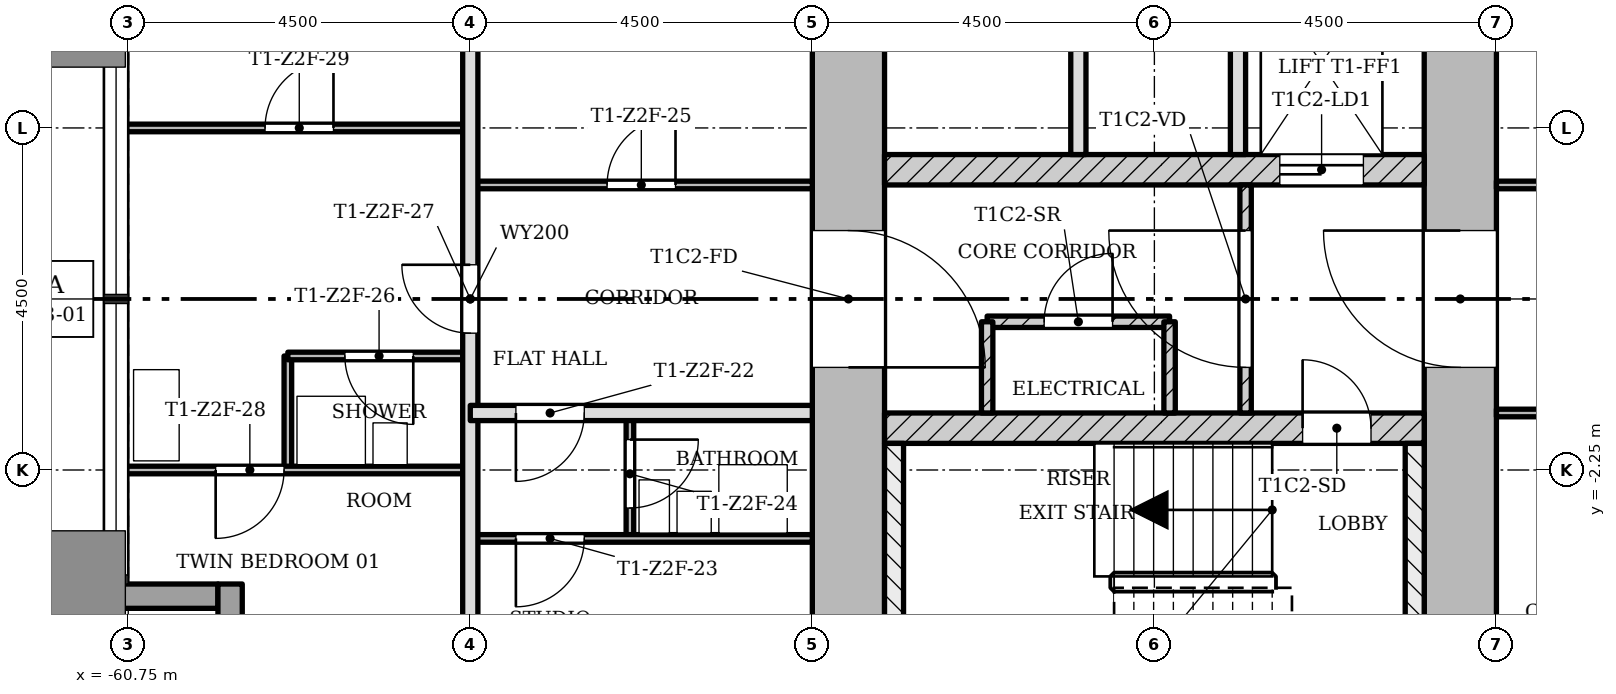
"""IFC4 building model, lengths in metres.
Left out: names, types, materials, properties, quantities, classifications, styles, units other than length and angle.
Written with IfcOpenShell. Run it as: python <this file> out.ifc"""

import sys

from ifc_helpers import new_model, si_unit, direction, frame, frame_2d, origin, place, context, subcontext, project, spatial, rectangle, extrude, element, fill, save


model = new_model("IFC4")
c1 = context("Model", 3, precision=1e-05, world=origin(), true_north=direction((0.0, 1.0)))
c2 = subcontext(c1, "Body", "Model", "MODEL_VIEW")
j1 = project(units=[si_unit("LENGTHUNIT", "METRE"), si_unit("PLANEANGLEUNIT", "RADIAN")], contexts=[c1])
p1 = place(None, origin())
s1 = spatial("IfcSite", under=j1, at=p1, CompositionType="ELEMENT")
p2 = place(p1, origin())
s2 = spatial("IfcBuilding", under=s1, at=p2, CompositionType="ELEMENT")
p3 = place(p2, frame((0.0, 0.0, 114.0)))
s3 = spatial("IfcBuildingStorey", under=s2, at=p3, CompositionType="ELEMENT", Elevation=114.0)
p4 = place(p3, frame((-43.225, -5.8, 0.0), z_axis=(0.0, 0.0, 1.0), x_axis=(0.0, 1.0, 0.0)))
e1 = element("IfcWall", 1, at=p4, inside=s3, PredefinedType="SHEAR", context=c2, shape_type="SweptSolid", body=[
    extrude(rectangle(XDim=12.55, YDim=0.95, at=frame_2d((6.275, 0.0))), origin(), (0.0, 0.0, 1.0), 3.4),
])
p5 = place(p4, frame((4.9, 0.0, 0.0)))
e2 = element("IfcOpeningElement", 2, at=p5, cuts=e1, PredefinedType="OPENING", context=c2, shape_type="SweptSolid", body=[
    extrude(rectangle(XDim=1.8, YDim=2.1, at=frame_2d((0.9, 1.05))), frame((0.0, 0.485, 0.0), z_axis=(0.0, -1.0, 0.0), x_axis=(1.0, 0.0, 0.0)), (0.0, 0.0, 1.0), 0.97),
])
p6 = place(p3, frame((-51.275, 5.8, 0.0), z_axis=(0.0, 0.0, 1.0), x_axis=(0.0, -1.0, 0.0)))
e3 = element("IfcWall", 3, at=p6, inside=s3, PredefinedType="SHEAR", context=c2, shape_type="SweptSolid", body=[
    extrude(rectangle(XDim=12.55, YDim=0.95, at=frame_2d((6.275, 0.0))), origin(), (0.0, 0.0, 1.0), 3.4),
])
p7 = place(p6, frame((4.9, 0.0, 0.0)))
e4 = element("IfcOpeningElement", 4, at=p7, cuts=e3, PredefinedType="OPENING", context=c2, shape_type="SweptSolid", body=[
    extrude(rectangle(XDim=1.8, YDim=2.1, at=frame_2d((0.9, 1.05))), frame((0.0, 0.485, 0.0), z_axis=(0.0, -1.0, 0.0), x_axis=(1.0, 0.0, 0.0)), (0.0, 0.0, 1.0), 0.97),
])
p8 = place(p3, frame((-50.8, -1.7, 0.0), z_axis=(0.0, 0.0, 1.0), x_axis=(1.0, 0.0, 0.0)))
e5 = element("IfcWall", 5, at=p8, inside=s3, PredefinedType="SHEAR", context=c2, shape_type="SweptSolid", body=[
    extrude(rectangle(XDim=7.1, YDim=0.4, at=frame_2d((3.55, 0.0))), origin(), (0.0, 0.0, 1.0), 3.4),
])
p9 = place(p8, frame((5.5, 0.0, 0.0)))
e6 = element("IfcOpeningElement", 6, at=p9, cuts=e5, PredefinedType="OPENING", context=c2, shape_type="SweptSolid", body=[
    extrude(rectangle(XDim=0.9, YDim=2.1, at=frame_2d((0.45, 1.05))), frame((0.0, 0.21, 0.0), z_axis=(0.0, -1.0, 0.0), x_axis=(1.0, 0.0, 0.0)), (0.0, 0.0, 1.0), 0.42),
])
p10 = place(p3, frame((-50.8, 1.7, 0.0), z_axis=(0.0, 0.0, 1.0), x_axis=(1.0, 0.0, 0.0)))
e7 = element("IfcWall", 7, at=p10, inside=s3, PredefinedType="SHEAR", context=c2, shape_type="SweptSolid", body=[
    extrude(rectangle(XDim=7.1, YDim=0.4, at=frame_2d((3.55, 0.0))), origin(), (0.0, 0.0, 1.0), 3.4),
])
p11 = place(p10, frame((5.2, 0.0, 0.0)))
e8 = element("IfcOpeningElement", 8, at=p11, cuts=e7, PredefinedType="OPENING", context=c2, shape_type="SweptSolid", body=[
    extrude(rectangle(XDim=1.1, YDim=2.1, at=frame_2d((0.55, 1.05))), frame((0.0, 0.21, 0.0), z_axis=(0.0, -1.0, 0.0), x_axis=(1.0, 0.0, 0.0)), (0.0, 0.0, 1.0), 0.42),
])
p12 = place(p3, frame((-61.07, -3.91, -0.3), z_axis=(0.0, 0.0, 1.0), x_axis=(1.0, 0.0, 0.0)))
e9 = element("IfcWall", 9, at=p12, inside=s3, PredefinedType="STANDARD", context=c2, shape_type="SweptSolid", body=[
    extrude(rectangle(XDim=1.5, YDim=0.32, at=frame_2d((0.75, 0.0))), origin(), (0.0, 0.0, 1.0), 3.4),
])
p13 = place(p3, frame((-59.41, -3.75, -0.3), z_axis=(0.0, 0.0, 1.0), x_axis=(0.0, -1.0, 0.0)))
e10 = element("IfcWall", 10, at=p13, inside=s3, PredefinedType="STANDARD", context=c2, shape_type="SweptSolid", body=[
    extrude(rectangle(XDim=1.82, YDim=0.32, at=frame_2d((0.91, 0.0))), origin(), (0.0, 0.0, 1.0), 3.4),
])
p14 = place(p13, frame((0.41, 0.0, 1.2)))
e11 = element("IfcOpeningElement", 11, at=p14, cuts=e10, PredefinedType="OPENING", context=c2, shape_type="SweptSolid", body=[
    extrude(rectangle(XDim=1.0, YDim=1.5, at=frame_2d((0.5, 0.75))), frame((0.0, 0.17, 0.0), z_axis=(0.0, -1.0, 0.0), x_axis=(1.0, 0.0, 0.0)), (0.0, 0.0, 1.0), 0.34),
])
p15 = place(p3, frame((-46.05, 1.5, 0.0), z_axis=(0.0, 0.0, 1.0), x_axis=(0.0, -1.0, 0.0)))
e12 = element("IfcWall", 12, at=p15, inside=s3, PredefinedType="PARTITIONING", context=c2, shape_type="SweptSolid", body=[
    extrude(rectangle(XDim=3.0, YDim=0.15, at=frame_2d((1.5, 0.0))), origin(), (0.0, 0.0, 1.0), 3.0),
])
p16 = place(p15, frame((0.6, 0.0, 0.0)))
e13 = element("IfcOpeningElement", 13, at=p16, cuts=e12, PredefinedType="OPENING", context=c2, shape_type="SweptSolid", body=[
    extrude(rectangle(XDim=1.8, YDim=2.1, at=frame_2d((0.9, 1.05))), frame((0.0, 0.085, 0.0), z_axis=(0.0, -1.0, 0.0), x_axis=(1.0, 0.0, 0.0)), (0.0, 0.0, 1.0), 0.17),
])
for number, where, z_axis, x_axis in (
    (14, (-46.15, 5.8, 0.0), (0.0, 0.0, 1.0), (0.0, -1.0, 0.0)),
    (15, (-48.25, 5.8, 0.0), (0.0, 0.0, 1.0), (0.0, -1.0, 0.0)),
):
    element("IfcWall", number, at=place(p3, frame(where, z_axis=z_axis, x_axis=x_axis)), inside=s3, PredefinedType="SOLIDWALL", context=c2, shape_type="SweptSolid", body=[
        extrude(rectangle(XDim=3.9, YDim=0.2, at=frame_2d((1.95, 0.0))), origin(), (0.0, 0.0, 1.0), 3.0),
    ])
p17 = place(p3, frame((-47.05, -0.3, 0.0), z_axis=(0.0, 0.0, 1.0), x_axis=(-1.0, 0.0, 0.0)))
e16 = element("IfcWall", 16, at=p17, inside=s3, PredefinedType="PARTITIONING", context=c2, shape_type="SweptSolid", body=[
    extrude(rectangle(XDim=2.4, YDim=0.15, at=frame_2d((1.2, 0.0))), origin(), (0.0, 0.0, 1.0), 3.0),
])
p18 = place(p17, frame((0.75, 0.0, 0.0)))
e17 = element("IfcOpeningElement", 17, at=p18, cuts=e16, PredefinedType="OPENING", context=c2, shape_type="SweptSolid", body=[
    extrude(rectangle(XDim=0.9, YDim=2.1, at=frame_2d((0.45, 1.05))), frame((0.0, 0.085, 0.0), z_axis=(0.0, -1.0, 0.0), x_axis=(1.0, 0.0, 0.0)), (0.0, 0.0, 1.0), 0.17),
])
for number, where, z_axis, x_axis in (
    (18, (-47.05, -0.3, 0.0), (0.0, 0.0, 1.0), (0.0, -1.0, 0.0)),
    (19, (-49.45, -0.3, 0.0), (0.0, 0.0, 1.0), (0.0, -1.0, 0.0)),
):
    element("IfcWall", number, at=place(p3, frame(where, z_axis=z_axis, x_axis=x_axis)), inside=s3, PredefinedType="PARTITIONING", context=c2, shape_type="SweptSolid", body=[
        extrude(rectangle(XDim=1.2, YDim=0.15, at=frame_2d((0.6, 0.0))), origin(), (0.0, 0.0, 1.0), 3.0),
    ])
p19 = place(p3, frame((-58.65, -2.25, 0.0), z_axis=(0.0, 0.0, 1.0), x_axis=(0.0, 1.0, 0.0)))
e20 = element("IfcWall", 20, at=p19, inside=s3, PredefinedType="PARTITIONING", context=c2, shape_type="SweptSolid", body=[
    extrude(rectangle(XDim=1.5, YDim=0.1, at=frame_2d((0.75, 0.0))), origin(), (0.0, 0.0, 1.0), 3.0),
])
p20 = place(p3, frame((-56.25, -6.85, 0.0), z_axis=(0.0, 0.0, 1.0), x_axis=(0.0, 1.0, 0.0)))
e21 = element("IfcWall", 21, at=p20, inside=s3, PredefinedType="SOLIDWALL", context=c2, shape_type="SweptSolid", body=[
    extrude(rectangle(XDim=13.7, YDim=0.2, at=frame_2d((6.85, 0.0))), origin(), (0.0, 0.0, 1.0), 3.0),
])
p21 = place(p20, frame((6.4, 0.0, 0.0)))
e22 = element("IfcOpeningElement", 22, at=p21, cuts=e21, PredefinedType="OPENING", context=c2, shape_type="SweptSolid", body=[
    extrude(rectangle(XDim=0.9, YDim=2.1, at=frame_2d((0.45, 1.05))), frame((0.0, 0.11, 0.0), z_axis=(0.0, -1.0, 0.0), x_axis=(1.0, 0.0, 0.0)), (0.0, 0.0, 1.0), 0.22),
])
p22 = place(p3, frame((-54.15, -3.15, 0.0), z_axis=(0.0, 0.0, 1.0), x_axis=(0.0, 1.0, 0.0)))
e23 = element("IfcWall", 23, at=p22, inside=s3, PredefinedType="PARTITIONING", context=c2, shape_type="SweptSolid", body=[
    extrude(rectangle(XDim=1.65, YDim=0.1, at=frame_2d((0.825, 0.0))), origin(), (0.0, 0.0, 1.0), 3.0),
])
p23 = place(p22, frame((0.4, 0.0, 0.0)))
e24 = element("IfcOpeningElement", 24, at=p23, cuts=e23, PredefinedType="OPENING", context=c2, shape_type="SweptSolid", body=[
    extrude(rectangle(XDim=0.9, YDim=2.1, at=frame_2d((0.45, 1.05))), frame((0.0, 0.06, 0.0), z_axis=(0.0, -1.0, 0.0), x_axis=(1.0, 0.0, 0.0)), (0.0, 0.0, 1.0), 0.12),
])
p24 = place(p3, frame((-56.25, -3.15, 0.0), z_axis=(0.0, 0.0, 1.0), x_axis=(1.0, 0.0, 0.0)))
e25 = element("IfcWall", 25, at=p24, inside=s3, PredefinedType="PARTITIONING", context=c2, shape_type="SweptSolid", body=[
    extrude(rectangle(XDim=4.5, YDim=0.1, at=frame_2d((2.25, 0.0))), origin(), (0.0, 0.0, 1.0), 3.0),
])
p25 = place(p24, frame((0.6, 0.0, 0.0)))
e26 = element("IfcOpeningElement", 26, at=p25, cuts=e25, PredefinedType="OPENING", context=c2, shape_type="SweptSolid", body=[
    extrude(rectangle(XDim=0.9, YDim=2.1, at=frame_2d((0.45, 1.05))), frame((0.0, 0.06, 0.0), z_axis=(0.0, -1.0, 0.0), x_axis=(1.0, 0.0, 0.0)), (0.0, 0.0, 1.0), 0.12),
])
p26 = place(p3, frame((-60.85, -2.25, 0.0), z_axis=(0.0, 0.0, 1.0), x_axis=(1.0, 0.0, 0.0)))
e27 = element("IfcWall", 27, at=p26, inside=s3, PredefinedType="PARTITIONING", context=c2, shape_type="SweptSolid", body=[
    extrude(rectangle(XDim=4.6, YDim=0.1, at=frame_2d((2.3, 0.0))), origin(), (0.0, 0.0, 1.0), 3.0),
])
p27 = place(p26, frame((1.25, 0.0, 0.0)))
e28 = element("IfcOpeningElement", 28, at=p27, cuts=e27, PredefinedType="OPENING", context=c2, shape_type="SweptSolid", body=[
    extrude(rectangle(XDim=0.9, YDim=2.1, at=frame_2d((0.45, 1.05))), frame((0.0, 0.06, 0.0), z_axis=(0.0, -1.0, 0.0), x_axis=(1.0, 0.0, 0.0)), (0.0, 0.0, 1.0), 0.12),
])
p28 = place(p3, frame((-42.75, -1.5, 0.0), z_axis=(0.0, 0.0, 1.0), x_axis=(1.0, 0.0, 0.0)))
e29 = element("IfcWall", 29, at=p28, inside=s3, PredefinedType="PARTITIONING", context=c2, shape_type="SweptSolid", body=[
    extrude(rectangle(XDim=5.85, YDim=0.1, at=frame_2d((2.925, 0.0))), origin(), (0.0, 0.0, 1.0), 3.0),
])
p29 = place(p28, frame((0.975, 0.0, 0.0)))
e30 = element("IfcOpeningElement", 30, at=p29, cuts=e29, PredefinedType="OPENING", context=c2, shape_type="SweptSolid", body=[
    extrude(rectangle(XDim=0.9, YDim=2.1, at=frame_2d((0.45, 1.05))), frame((0.0, 0.06, 0.0), z_axis=(0.0, -1.0, 0.0), x_axis=(1.0, 0.0, 0.0)), (0.0, 0.0, 1.0), 0.12),
])
p30 = place(p3, frame((-56.25, -1.5, 0.0), z_axis=(0.0, 0.0, 1.0), x_axis=(1.0, 0.0, 0.0)))
e31 = element("IfcWall", 31, at=p30, inside=s3, PredefinedType="SOLIDWALL", context=c2, shape_type="SweptSolid", body=[
    extrude(rectangle(XDim=4.5, YDim=0.2, at=frame_2d((2.25, 0.0))), origin(), (0.0, 0.0, 1.0), 3.0),
])
p31 = place(p30, frame((0.6, 0.0, 0.0)))
e32 = element("IfcOpeningElement", 32, at=p31, cuts=e31, PredefinedType="OPENING", context=c2, shape_type="SweptSolid", body=[
    extrude(rectangle(XDim=0.9, YDim=2.1, at=frame_2d((0.45, 1.05))), frame((0.0, 0.11, 0.0), z_axis=(0.0, -1.0, 0.0), x_axis=(1.0, 0.0, 0.0)), (0.0, 0.0, 1.0), 0.22),
])
p32 = place(p3, frame((-58.65, -0.75, 0.0), z_axis=(0.0, 0.0, 1.0), x_axis=(1.0, 0.0, 0.0)))
e33 = element("IfcWall", 33, at=p32, inside=s3, PredefinedType="PARTITIONING", context=c2, shape_type="SweptSolid", body=[
    extrude(rectangle(XDim=2.4, YDim=0.1, at=frame_2d((1.2, 0.0))), origin(), (0.0, 0.0, 1.0), 3.0),
])
p33 = place(p32, frame((0.75, 0.0, 0.0)))
e34 = element("IfcOpeningElement", 34, at=p33, cuts=e33, PredefinedType="OPENING", context=c2, shape_type="SweptSolid", body=[
    extrude(rectangle(XDim=0.9, YDim=2.1, at=frame_2d((0.45, 1.05))), frame((0.0, 0.06, 0.0), z_axis=(0.0, -1.0, 0.0), x_axis=(1.0, 0.0, 0.0)), (0.0, 0.0, 1.0), 0.12),
])
p34 = place(p3, frame((-56.25, 1.5, 0.0), z_axis=(0.0, 0.0, 1.0), x_axis=(1.0, 0.0, 0.0)))
e35 = element("IfcWall", 35, at=p34, inside=s3, PredefinedType="PARTITIONING", context=c2, shape_type="SweptSolid", body=[
    extrude(rectangle(XDim=4.5, YDim=0.1, at=frame_2d((2.25, 0.0))), origin(), (0.0, 0.0, 1.0), 3.0),
])
p35 = place(p34, frame((1.8, 0.0, 0.0)))
e36 = element("IfcOpeningElement", 36, at=p35, cuts=e35, PredefinedType="OPENING", context=c2, shape_type="SweptSolid", body=[
    extrude(rectangle(XDim=0.9, YDim=2.1, at=frame_2d((0.45, 1.05))), frame((0.0, 0.06, 0.0), z_axis=(0.0, -1.0, 0.0), x_axis=(1.0, 0.0, 0.0)), (0.0, 0.0, 1.0), 0.12),
])
p36 = place(p3, frame((-42.75, 1.5, 0.0), z_axis=(0.0, 0.0, 1.0), x_axis=(1.0, 0.0, 0.0)))
e37 = element("IfcWall", 37, at=p36, inside=s3, PredefinedType="PARTITIONING", context=c2, shape_type="SweptSolid", body=[
    extrude(rectangle(XDim=5.85, YDim=0.1, at=frame_2d((2.925, 0.0))), origin(), (0.0, 0.0, 1.0), 3.0),
])
p37 = place(p36, frame((1.575, 0.0, 0.0)))
e38 = element("IfcOpeningElement", 38, at=p37, cuts=e37, PredefinedType="OPENING", context=c2, shape_type="SweptSolid", body=[
    extrude(rectangle(XDim=0.9, YDim=2.1, at=frame_2d((0.45, 1.05))), frame((0.0, 0.06, 0.0), z_axis=(0.0, -1.0, 0.0), x_axis=(1.0, 0.0, 0.0)), (0.0, 0.0, 1.0), 0.12),
])
p38 = place(p3, frame((-60.85, 2.25, 0.0), z_axis=(0.0, 0.0, 1.0), x_axis=(1.0, 0.0, 0.0)))
e39 = element("IfcWall", 39, at=p38, inside=s3, PredefinedType="PARTITIONING", context=c2, shape_type="SweptSolid", body=[
    extrude(rectangle(XDim=4.6, YDim=0.1, at=frame_2d((2.3, 0.0))), origin(), (0.0, 0.0, 1.0), 3.0),
])
p39 = place(p38, frame((1.9, 0.0, 0.0)))
e40 = element("IfcOpeningElement", 40, at=p39, cuts=e39, PredefinedType="OPENING", context=c2, shape_type="SweptSolid", body=[
    extrude(rectangle(XDim=0.9, YDim=2.1, at=frame_2d((0.45, 1.05))), frame((0.0, 0.06, 0.0), z_axis=(0.0, -1.0, 0.0), x_axis=(1.0, 0.0, 0.0)), (0.0, 0.0, 1.0), 0.12),
])
for number, where, z_axis, x_axis in (
    (41, (-50.675, -1.9, 0.0), (0.0, 0.0, 1.0), (0.0, -1.0, 0.0)),
    (42, (-43.825, -1.9, 0.0), (0.0, 0.0, 1.0), (0.0, -1.0, 0.0)),
):
    element("IfcWall", number, at=place(p3, frame(where, z_axis=z_axis, x_axis=x_axis)), inside=s3, PredefinedType="SHEAR", context=c2, shape_type="SweptSolid", body=[
        extrude(rectangle(XDim=3.9, YDim=0.25, at=frame_2d((1.95, 0.0))), origin(), (0.0, 0.0, 1.0), 3.4),
    ])
p40 = place(p16, origin())
e43 = element("IfcDoor", 43, at=p40, inside=s3, OperationType="SINGLE_SWING_LEFT", PredefinedType="DOOR", context=c2, shape_type="SweptSolid", body=[
    extrude(rectangle(XDim=1.8, YDim=2.1, at=frame_2d((0.9, 1.05))), frame((0.0, 0.025, 0.0), z_axis=(0.0, -1.0, 0.0), x_axis=(1.0, 0.0, 0.0)), (0.0, 0.0, 1.0), 0.05),
])
fill(e13, e43)
p41 = place(p18, origin())
e44 = element("IfcDoor", 44, at=p41, inside=s3, OperationType="SINGLE_SWING_LEFT", PredefinedType="DOOR", context=c2, shape_type="SweptSolid", body=[
    extrude(rectangle(XDim=0.9, YDim=2.1, at=frame_2d((0.45, 1.05))), frame((0.0, 0.025, 0.0), z_axis=(0.0, -1.0, 0.0), x_axis=(1.0, 0.0, 0.0)), (0.0, 0.0, 1.0), 0.05),
])
fill(e17, e44)
p42 = place(p31, origin())
e45 = element("IfcDoor", 45, at=p42, inside=s3, OperationType="SINGLE_SWING_LEFT", PredefinedType="DOOR", context=c2, shape_type="SweptSolid", body=[
    extrude(rectangle(XDim=0.9, YDim=2.1, at=frame_2d((0.45, 1.05))), frame((0.0, 0.025, 0.0), z_axis=(0.0, -1.0, 0.0), x_axis=(1.0, 0.0, 0.0)), (0.0, 0.0, 1.0), 0.05),
])
fill(e32, e45)
p43 = place(p25, origin())
e46 = element("IfcDoor", 46, at=p43, inside=s3, OperationType="SINGLE_SWING_LEFT", PredefinedType="DOOR", context=c2, shape_type="SweptSolid", body=[
    extrude(rectangle(XDim=0.9, YDim=2.1, at=frame_2d((0.45, 1.05))), frame((0.0, 0.025, 0.0), z_axis=(0.0, -1.0, 0.0), x_axis=(1.0, 0.0, 0.0)), (0.0, 0.0, 1.0), 0.05),
])
fill(e26, e46)
p44 = place(p23, origin())
e47 = element("IfcDoor", 47, at=p44, inside=s3, OperationType="SINGLE_SWING_RIGHT", PredefinedType="DOOR", context=c2, shape_type="SweptSolid", body=[
    extrude(rectangle(XDim=0.9, YDim=2.1, at=frame_2d((0.45, 1.05))), frame((0.0, 0.025, 0.0), z_axis=(0.0, -1.0, 0.0), x_axis=(1.0, 0.0, 0.0)), (0.0, 0.0, 1.0), 0.05),
])
fill(e24, e47)
p45 = place(p35, origin())
e48 = element("IfcDoor", 48, at=p45, inside=s3, OperationType="SINGLE_SWING_LEFT", PredefinedType="DOOR", context=c2, shape_type="SweptSolid", body=[
    extrude(rectangle(XDim=0.9, YDim=2.1, at=frame_2d((0.45, 1.05))), frame((0.0, 0.025, 0.0), z_axis=(0.0, -1.0, 0.0), x_axis=(1.0, 0.0, 0.0)), (0.0, 0.0, 1.0), 0.05),
])
fill(e36, e48)
p46 = place(p33, origin())
e49 = element("IfcDoor", 49, at=p46, inside=s3, OperationType="SINGLE_SWING_RIGHT", PredefinedType="DOOR", context=c2, shape_type="SweptSolid", body=[
    extrude(rectangle(XDim=0.9, YDim=2.1, at=frame_2d((0.45, 1.05))), frame((0.0, 0.025, 0.0), z_axis=(0.0, -1.0, 0.0), x_axis=(1.0, 0.0, 0.0)), (0.0, 0.0, 1.0), 0.05),
])
fill(e34, e49)
p47 = place(p21, origin())
e50 = element("IfcDoor", 50, at=p47, inside=s3, OperationType="SINGLE_SWING_LEFT", PredefinedType="DOOR", context=c2, shape_type="SweptSolid", body=[
    extrude(rectangle(XDim=0.9, YDim=2.1, at=frame_2d((0.45, 1.05))), frame((0.0, 0.025, 0.0), z_axis=(0.0, -1.0, 0.0), x_axis=(1.0, 0.0, 0.0)), (0.0, 0.0, 1.0), 0.05),
])
fill(e22, e50)
p48 = place(p27, origin())
e51 = element("IfcDoor", 51, at=p48, inside=s3, OperationType="SINGLE_SWING_LEFT", PredefinedType="DOOR", context=c2, shape_type="SweptSolid", body=[
    extrude(rectangle(XDim=0.9, YDim=2.1, at=frame_2d((0.45, 1.05))), frame((0.0, 0.025, 0.0), z_axis=(0.0, -1.0, 0.0), x_axis=(1.0, 0.0, 0.0)), (0.0, 0.0, 1.0), 0.05),
])
fill(e28, e51)
p49 = place(p39, origin())
e52 = element("IfcDoor", 52, at=p49, inside=s3, OperationType="SINGLE_SWING_LEFT", PredefinedType="DOOR", context=c2, shape_type="SweptSolid", body=[
    extrude(rectangle(XDim=0.9, YDim=2.1, at=frame_2d((0.45, 1.05))), frame((0.0, 0.025, 0.0), z_axis=(0.0, -1.0, 0.0), x_axis=(1.0, 0.0, 0.0)), (0.0, 0.0, 1.0), 0.05),
])
fill(e40, e52)
p50 = place(p9, origin())
e53 = element("IfcDoor", 53, at=p50, inside=s3, OperationType="SINGLE_SWING_RIGHT", PredefinedType="DOOR", context=c2, shape_type="SweptSolid", body=[
    extrude(rectangle(XDim=0.9, YDim=2.1, at=frame_2d((0.45, 1.05))), frame((0.0, 0.025, 0.0), z_axis=(0.0, -1.0, 0.0), x_axis=(1.0, 0.0, 0.0)), (0.0, 0.0, 1.0), 0.05),
])
fill(e6, e53)
p51 = place(p11, origin())
e54 = element("IfcDoor", 54, at=p51, inside=s3, OperationType="SLIDING_TO_LEFT", PredefinedType="DOOR", context=c2, shape_type="SweptSolid", body=[
    extrude(rectangle(XDim=1.1, YDim=2.1, at=frame_2d((0.55, 1.05))), frame((0.0, 0.025, 0.0), z_axis=(0.0, -1.0, 0.0), x_axis=(1.0, 0.0, 0.0)), (0.0, 0.0, 1.0), 0.05),
])
fill(e8, e54)
p52 = place(p5, origin())
e55 = element("IfcDoor", 55, at=p52, inside=s3, OperationType="SINGLE_SWING_LEFT", PredefinedType="DOOR", context=c2, shape_type="SweptSolid", body=[
    extrude(rectangle(XDim=1.8, YDim=2.1, at=frame_2d((0.9, 1.05))), frame((0.0, 0.025, 0.0), z_axis=(0.0, -1.0, 0.0), x_axis=(1.0, 0.0, 0.0)), (0.0, 0.0, 1.0), 0.05),
])
fill(e2, e55)
p53 = place(p7, origin())
e56 = element("IfcDoor", 56, at=p53, inside=s3, OperationType="SINGLE_SWING_LEFT", PredefinedType="DOOR", context=c2, shape_type="SweptSolid", body=[
    extrude(rectangle(XDim=1.8, YDim=2.1, at=frame_2d((0.9, 1.05))), frame((0.0, 0.025, 0.0), z_axis=(0.0, -1.0, 0.0), x_axis=(1.0, 0.0, 0.0)), (0.0, 0.0, 1.0), 0.05),
])
fill(e4, e56)
save(model, sys.argv[1])
